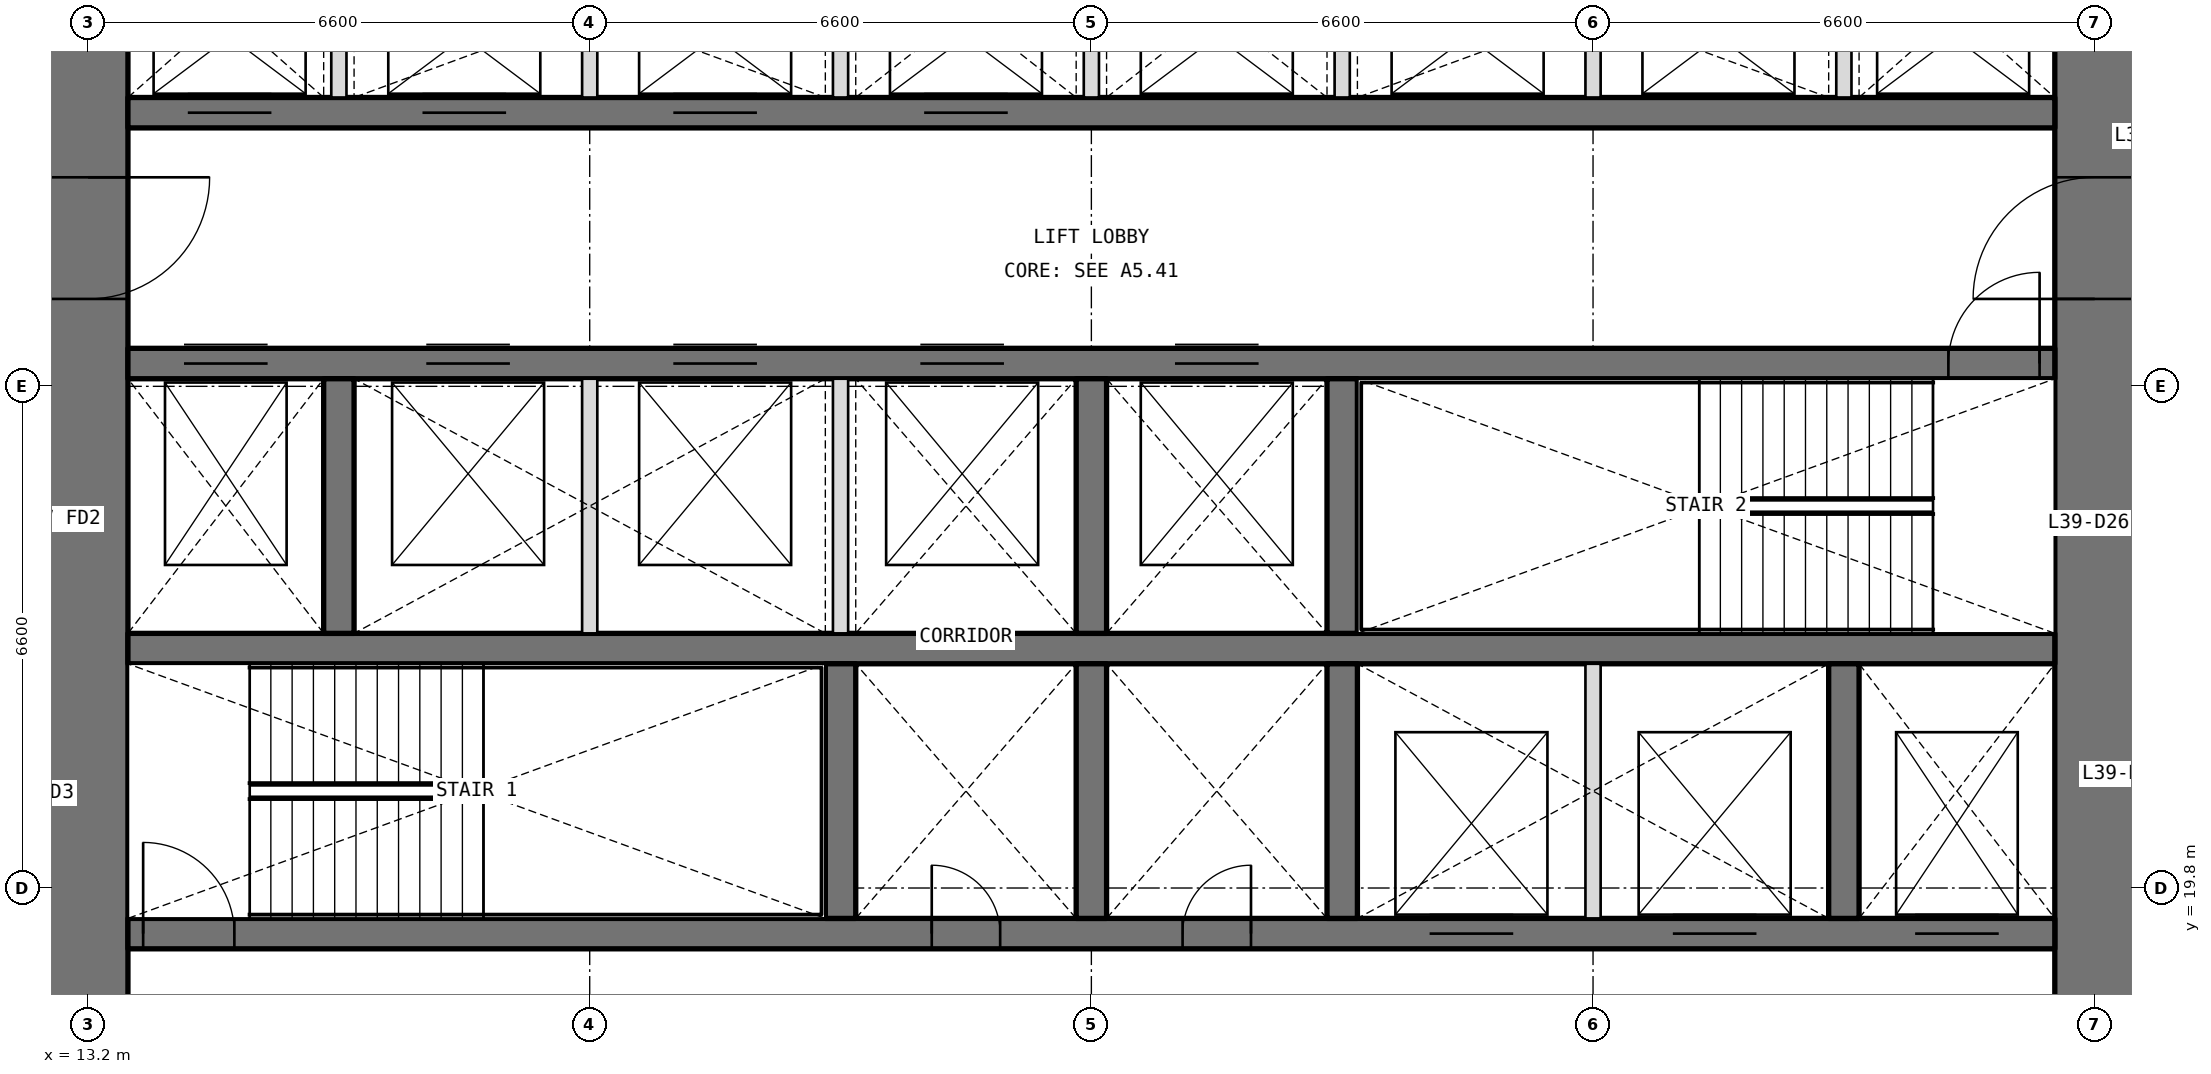
"""IFC4 building model, lengths in metres.
Left out: names, types, materials, properties, quantities, classifications, styles, units other than length and angle.
Written with IfcOpenShell. Run it as: python <this file> out.ifc"""

import sys

from ifc_helpers import new_model, si_unit, direction, frame, frame_2d, origin, place, context, subcontext, project, spatial, rectangle, extrude, element, fill, save


model = new_model("IFC4")
c1 = context("Model", 3, precision=1e-05, world=origin(), true_north=direction((0.0, 1.0)))
c2 = subcontext(c1, "Body", "Model", "MODEL_VIEW")
j1 = project(units=[si_unit("LENGTHUNIT", "METRE"), si_unit("PLANEANGLEUNIT", "RADIAN")], contexts=[c1])
p1 = place(None, origin())
s1 = spatial("IfcSite", under=j1, at=p1, CompositionType="ELEMENT")
p2 = place(p1, origin())
s2 = spatial("IfcBuilding", under=s1, at=p2, CompositionType="ELEMENT")
p3 = place(p2, frame((0.0, 0.0, 172.5)))
s3 = spatial("IfcBuildingStorey", under=s2, at=p3, CompositionType="ELEMENT", Elevation=172.5)
p4 = place(p3, frame((39.6, 13.725, 0.0), z_axis=(0.0, 0.0, 1.0), x_axis=(0.0, 1.0, 0.0)))
e1 = element("IfcWall", 1, at=p4, inside=s3, PredefinedType="SHEAR", context=c2, shape_type="SweptSolid", body=[
    extrude(rectangle(XDim=18.75, YDim=1.05, at=frame_2d((9.375, 0.0))), origin(), (0.0, 0.0, 1.0), 4.2),
])
p5 = place(p4, frame((3.025, 0.0, 0.0)))
e2 = element("IfcOpeningElement", 2, at=p5, cuts=e1, PredefinedType="OPENING", context=c2, shape_type="SweptSolid", body=[
    extrude(rectangle(XDim=1.6, YDim=2.1, at=frame_2d((0.8, 1.05))), frame((0.0, 0.535, 0.0), z_axis=(0.0, -1.0, 0.0), x_axis=(1.0, 0.0, 0.0)), (0.0, 0.0, 1.0), 1.07),
])
p6 = place(p4, frame((13.825, 0.0, 0.0)))
e3 = element("IfcOpeningElement", 3, at=p6, cuts=e1, PredefinedType="OPENING", context=c2, shape_type="SweptSolid", body=[
    extrude(rectangle(XDim=1.6, YDim=2.1, at=frame_2d((0.8, 1.05))), frame((0.0, 0.535, 0.0), z_axis=(0.0, -1.0, 0.0), x_axis=(1.0, 0.0, 0.0)), (0.0, 0.0, 1.0), 1.07),
])
p7 = place(p3, frame((13.2, 32.475, 0.0), z_axis=(0.0, 0.0, 1.0), x_axis=(0.0, -1.0, 0.0)))
e4 = element("IfcWall", 4, at=p7, inside=s3, PredefinedType="SHEAR", context=c2, shape_type="SweptSolid", body=[
    extrude(rectangle(XDim=18.75, YDim=1.05, at=frame_2d((9.375, 0.0))), origin(), (0.0, 0.0, 1.0), 4.2),
])
p8 = place(p7, frame((14.125, 0.0, 0.0)))
e5 = element("IfcOpeningElement", 5, at=p8, cuts=e4, PredefinedType="OPENING", context=c2, shape_type="SweptSolid", body=[
    extrude(rectangle(XDim=1.6, YDim=2.1, at=frame_2d((0.8, 1.05))), frame((0.0, 0.535, 0.0), z_axis=(0.0, -1.0, 0.0), x_axis=(1.0, 0.0, 0.0)), (0.0, 0.0, 1.0), 1.07),
])
p9 = place(p7, frame((3.325, 0.0, 0.0)))
e6 = element("IfcOpeningElement", 6, at=p9, cuts=e4, PredefinedType="OPENING", context=c2, shape_type="SweptSolid", body=[
    extrude(rectangle(XDim=1.6, YDim=2.1, at=frame_2d((0.8, 1.05))), frame((0.0, 0.535, 0.0), z_axis=(0.0, -1.0, 0.0), x_axis=(1.0, 0.0, 0.0)), (0.0, 0.0, 1.0), 1.07),
])
p10 = place(p3, frame((13.725, 19.2, 0.0), z_axis=(0.0, 0.0, 1.0), x_axis=(1.0, 0.0, 0.0)))
e7 = element("IfcWall", 7, at=p10, inside=s3, PredefinedType="SHEAR", context=c2, shape_type="SweptSolid", body=[
    extrude(rectangle(XDim=25.35, YDim=0.4, at=frame_2d((12.675, 0.0))), origin(), (0.0, 0.0, 1.0), 4.2),
])
p11 = place(p10, frame((10.575, 0.0, 0.0)))
e8 = element("IfcOpeningElement", 8, at=p11, cuts=e7, PredefinedType="OPENING", context=c2, shape_type="SweptSolid", body=[
    extrude(rectangle(XDim=0.9, YDim=2.1, at=frame_2d((0.45, 1.05))), frame((0.0, 0.21, 0.0), z_axis=(0.0, -1.0, 0.0), x_axis=(1.0, 0.0, 0.0)), (0.0, 0.0, 1.0), 0.42),
])
p12 = place(p10, frame((13.875, 0.0, 0.0)))
e9 = element("IfcOpeningElement", 9, at=p12, cuts=e7, PredefinedType="OPENING", context=c2, shape_type="SweptSolid", body=[
    extrude(rectangle(XDim=0.9, YDim=2.1, at=frame_2d((0.45, 1.05))), frame((0.0, 0.21, 0.0), z_axis=(0.0, -1.0, 0.0), x_axis=(1.0, 0.0, 0.0)), (0.0, 0.0, 1.0), 0.42),
])
p13 = place(p10, frame((0.2, 0.0, 0.0)))
e10 = element("IfcOpeningElement", 10, at=p13, cuts=e7, PredefinedType="OPENING", context=c2, shape_type="SweptSolid", body=[
    extrude(rectangle(XDim=1.2, YDim=2.1, at=frame_2d((0.6, 1.05))), frame((0.0, 0.21, 0.0), z_axis=(0.0, -1.0, 0.0), x_axis=(1.0, 0.0, 0.0)), (0.0, 0.0, 1.0), 0.42),
])
p14 = place(p10, frame((23.512, 0.0, 0.0)))
e11 = element("IfcOpeningElement", 11, at=p14, cuts=e7, PredefinedType="OPENING", context=c2, shape_type="SweptSolid", body=[
    extrude(rectangle(XDim=1.1, YDim=2.1, at=frame_2d((0.55, 1.05))), frame((0.0, 0.21, 0.0), z_axis=(0.0, -1.0, 0.0), x_axis=(1.0, 0.0, 0.0)), (0.0, 0.0, 1.0), 0.42),
])
p15 = place(p10, frame((17.125, 0.0, 0.0)))
e12 = element("IfcOpeningElement", 12, at=p15, cuts=e7, PredefinedType="OPENING", context=c2, shape_type="SweptSolid", body=[
    extrude(rectangle(XDim=1.1, YDim=2.1, at=frame_2d((0.55, 1.05))), frame((0.0, 0.21, 0.0), z_axis=(0.0, -1.0, 0.0), x_axis=(1.0, 0.0, 0.0)), (0.0, 0.0, 1.0), 0.42),
])
p16 = place(p10, frame((20.325, 0.0, 0.0)))
e13 = element("IfcOpeningElement", 13, at=p16, cuts=e7, PredefinedType="OPENING", context=c2, shape_type="SweptSolid", body=[
    extrude(rectangle(XDim=1.1, YDim=2.1, at=frame_2d((0.55, 1.05))), frame((0.0, 0.21, 0.0), z_axis=(0.0, -1.0, 0.0), x_axis=(1.0, 0.0, 0.0)), (0.0, 0.0, 1.0), 0.42),
])
p17 = place(p3, frame((13.725, 22.95, 0.0), z_axis=(0.0, 0.0, 1.0), x_axis=(1.0, 0.0, 0.0)))
e14 = element("IfcWall", 14, at=p17, inside=s3, PredefinedType="SHEAR", context=c2, shape_type="SweptSolid", body=[
    extrude(rectangle(XDim=25.35, YDim=0.4, at=frame_2d((12.675, 0.0))), origin(), (0.0, 0.0, 1.0), 4.2),
])
p18 = place(p3, frame((13.725, 26.7, 0.0), z_axis=(0.0, 0.0, 1.0), x_axis=(1.0, 0.0, 0.0)))
e15 = element("IfcWall", 15, at=p18, inside=s3, PredefinedType="SHEAR", context=c2, shape_type="SweptSolid", body=[
    extrude(rectangle(XDim=25.35, YDim=0.4, at=frame_2d((12.675, 0.0))), origin(), (0.0, 0.0, 1.0), 4.2),
])
p19 = place(p18, frame((23.95, 0.0, 0.0)))
e16 = element("IfcOpeningElement", 16, at=p19, cuts=e15, PredefinedType="OPENING", context=c2, shape_type="SweptSolid", body=[
    extrude(rectangle(XDim=1.2, YDim=2.1, at=frame_2d((0.6, 1.05))), frame((0.0, 0.21, 0.0), z_axis=(0.0, -1.0, 0.0), x_axis=(1.0, 0.0, 0.0)), (0.0, 0.0, 1.0), 0.42),
])
p20 = place(p18, frame((0.738, 0.0, 0.0)))
e17 = element("IfcOpeningElement", 17, at=p20, cuts=e15, PredefinedType="OPENING", context=c2, shape_type="SweptSolid", body=[
    extrude(rectangle(XDim=1.1, YDim=2.1, at=frame_2d((0.55, 1.05))), frame((0.0, 0.21, 0.0), z_axis=(0.0, -1.0, 0.0), x_axis=(1.0, 0.0, 0.0)), (0.0, 0.0, 1.0), 0.42),
])
p21 = place(p18, frame((3.925, 0.0, 0.0)))
e18 = element("IfcOpeningElement", 18, at=p21, cuts=e15, PredefinedType="OPENING", context=c2, shape_type="SweptSolid", body=[
    extrude(rectangle(XDim=1.1, YDim=2.1, at=frame_2d((0.55, 1.05))), frame((0.0, 0.21, 0.0), z_axis=(0.0, -1.0, 0.0), x_axis=(1.0, 0.0, 0.0)), (0.0, 0.0, 1.0), 0.42),
])
p22 = place(p18, frame((7.175, 0.0, 0.0)))
e19 = element("IfcOpeningElement", 19, at=p22, cuts=e15, PredefinedType="OPENING", context=c2, shape_type="SweptSolid", body=[
    extrude(rectangle(XDim=1.1, YDim=2.1, at=frame_2d((0.55, 1.05))), frame((0.0, 0.21, 0.0), z_axis=(0.0, -1.0, 0.0), x_axis=(1.0, 0.0, 0.0)), (0.0, 0.0, 1.0), 0.42),
])
p23 = place(p18, frame((10.425, 0.0, 0.0)))
e20 = element("IfcOpeningElement", 20, at=p23, cuts=e15, PredefinedType="OPENING", context=c2, shape_type="SweptSolid", body=[
    extrude(rectangle(XDim=1.1, YDim=2.1, at=frame_2d((0.55, 1.05))), frame((0.0, 0.21, 0.0), z_axis=(0.0, -1.0, 0.0), x_axis=(1.0, 0.0, 0.0)), (0.0, 0.0, 1.0), 0.42),
])
p24 = place(p18, frame((13.775, 0.0, 0.0)))
e21 = element("IfcOpeningElement", 21, at=p24, cuts=e15, PredefinedType="OPENING", context=c2, shape_type="SweptSolid", body=[
    extrude(rectangle(XDim=1.1, YDim=2.1, at=frame_2d((0.55, 1.05))), frame((0.0, 0.21, 0.0), z_axis=(0.0, -1.0, 0.0), x_axis=(1.0, 0.0, 0.0)), (0.0, 0.0, 1.0), 0.42),
])
p25 = place(p3, frame((13.725, 30.0, 0.0), z_axis=(0.0, 0.0, 1.0), x_axis=(1.0, 0.0, 0.0)))
e22 = element("IfcWall", 22, at=p25, inside=s3, PredefinedType="SHEAR", context=c2, shape_type="SweptSolid", body=[
    extrude(rectangle(XDim=25.35, YDim=0.4, at=frame_2d((12.675, 0.0))), origin(), (0.0, 0.0, 1.0), 4.2),
])
p26 = place(p25, frame((0.788, 0.0, 0.0)))
e23 = element("IfcOpeningElement", 23, at=p26, cuts=e22, PredefinedType="OPENING", context=c2, shape_type="SweptSolid", body=[
    extrude(rectangle(XDim=1.1, YDim=2.1, at=frame_2d((0.55, 1.05))), frame((0.0, 0.21, 0.0), z_axis=(0.0, -1.0, 0.0), x_axis=(1.0, 0.0, 0.0)), (0.0, 0.0, 1.0), 0.42),
])
p27 = place(p25, frame((3.875, 0.0, 0.0)))
e24 = element("IfcOpeningElement", 24, at=p27, cuts=e22, PredefinedType="OPENING", context=c2, shape_type="SweptSolid", body=[
    extrude(rectangle(XDim=1.1, YDim=2.1, at=frame_2d((0.55, 1.05))), frame((0.0, 0.21, 0.0), z_axis=(0.0, -1.0, 0.0), x_axis=(1.0, 0.0, 0.0)), (0.0, 0.0, 1.0), 0.42),
])
p28 = place(p25, frame((7.175, 0.0, 0.0)))
e25 = element("IfcOpeningElement", 25, at=p28, cuts=e22, PredefinedType="OPENING", context=c2, shape_type="SweptSolid", body=[
    extrude(rectangle(XDim=1.1, YDim=2.1, at=frame_2d((0.55, 1.05))), frame((0.0, 0.21, 0.0), z_axis=(0.0, -1.0, 0.0), x_axis=(1.0, 0.0, 0.0)), (0.0, 0.0, 1.0), 0.42),
])
p29 = place(p25, frame((10.475, 0.0, 0.0)))
e26 = element("IfcOpeningElement", 26, at=p29, cuts=e22, PredefinedType="OPENING", context=c2, shape_type="SweptSolid", body=[
    extrude(rectangle(XDim=1.1, YDim=2.1, at=frame_2d((0.55, 1.05))), frame((0.0, 0.21, 0.0), z_axis=(0.0, -1.0, 0.0), x_axis=(1.0, 0.0, 0.0)), (0.0, 0.0, 1.0), 0.42),
])
for number, where, z_axis, x_axis in (
    (27, (23.1, 19.4, 0.0), (0.0, 0.0, 1.0), (0.0, 1.0, 0.0)),
    (28, (26.4, 19.4, 0.0), (0.0, 0.0, 1.0), (0.0, 1.0, 0.0)),
    (29, (29.7, 19.4, 0.0), (0.0, 0.0, 1.0), (0.0, 1.0, 0.0)),
    (30, (36.3, 19.4, 0.0), (0.0, 0.0, 1.0), (0.0, 1.0, 0.0)),
    (31, (16.5, 23.15, 0.0), (0.0, 0.0, 1.0), (0.0, 1.0, 0.0)),
    (32, (26.4, 23.15, 0.0), (0.0, 0.0, 1.0), (0.0, 1.0, 0.0)),
    (33, (29.7, 23.15, 0.0), (0.0, 0.0, 1.0), (0.0, 1.0, 0.0)),
):
    element("IfcWall", number, at=place(p3, frame(where, z_axis=z_axis, x_axis=x_axis)), inside=s3, PredefinedType="SHEAR", context=c2, shape_type="SweptSolid", body=[
        extrude(rectangle(XDim=3.35, YDim=0.4, at=frame_2d((1.675, 0.0))), origin(), (0.0, 0.0, 1.0), 4.2),
    ])
for number, where, z_axis, x_axis in (
    (34, (16.5, 30.2, 0.0), (0.0, 0.0, 1.0), (0.0, 1.0, 0.0)),
    (35, (19.8, 30.2, 0.0), (0.0, 0.0, 1.0), (0.0, 1.0, 0.0)),
    (36, (23.1, 30.2, 0.0), (0.0, 0.0, 1.0), (0.0, 1.0, 0.0)),
    (37, (26.4, 30.2, 0.0), (0.0, 0.0, 1.0), (0.0, 1.0, 0.0)),
    (38, (29.7, 30.2, 0.0), (0.0, 0.0, 1.0), (0.0, 1.0, 0.0)),
    (39, (33.0, 30.2, 0.0), (0.0, 0.0, 1.0), (0.0, 1.0, 0.0)),
    (40, (36.3, 30.2, 0.0), (0.0, 0.0, 1.0), (0.0, 1.0, 0.0)),
):
    element("IfcWall", number, at=place(p3, frame(where, z_axis=z_axis, x_axis=x_axis)), inside=s3, PredefinedType="PARTITIONING", context=c2, shape_type="SweptSolid", body=[
        extrude(rectangle(XDim=2.275, YDim=0.2, at=frame_2d((1.138, 0.0))), origin(), (0.0, 0.0, 1.0), 4.2),
    ])
for number, where, z_axis, x_axis in (
    (41, (33.0, 19.4, 0.0), (0.0, 0.0, 1.0), (0.0, 1.0, 0.0)),
    (42, (19.8, 23.15, 0.0), (0.0, 0.0, 1.0), (0.0, 1.0, 0.0)),
    (43, (23.1, 23.15, 0.0), (0.0, 0.0, 1.0), (0.0, 1.0, 0.0)),
):
    element("IfcWall", number, at=place(p3, frame(where, z_axis=z_axis, x_axis=x_axis)), inside=s3, PredefinedType="PARTITIONING", context=c2, shape_type="SweptSolid", body=[
        extrude(rectangle(XDim=3.35, YDim=0.2, at=frame_2d((1.675, 0.0))), origin(), (0.0, 0.0, 1.0), 4.2),
    ])
p30 = place(p11, origin())
e44 = element("IfcDoor", 44, at=p30, inside=s3, OperationType="SINGLE_SWING_LEFT", PredefinedType="DOOR", context=c2, shape_type="SweptSolid", body=[
    extrude(rectangle(XDim=0.9, YDim=2.1, at=frame_2d((0.45, 1.05))), frame((0.0, 0.025, 0.0), z_axis=(0.0, -1.0, 0.0), x_axis=(1.0, 0.0, 0.0)), (0.0, 0.0, 1.0), 0.05),
])
fill(e8, e44)
p31 = place(p12, origin())
e45 = element("IfcDoor", 45, at=p31, inside=s3, OperationType="SINGLE_SWING_RIGHT", PredefinedType="DOOR", context=c2, shape_type="SweptSolid", body=[
    extrude(rectangle(XDim=0.9, YDim=2.1, at=frame_2d((0.45, 1.05))), frame((0.0, 0.025, 0.0), z_axis=(0.0, -1.0, 0.0), x_axis=(1.0, 0.0, 0.0)), (0.0, 0.0, 1.0), 0.05),
])
fill(e9, e45)
p32 = place(p13, origin())
e46 = element("IfcDoor", 46, at=p32, inside=s3, OperationType="SINGLE_SWING_LEFT", PredefinedType="DOOR", context=c2, shape_type="SweptSolid", body=[
    extrude(rectangle(XDim=1.2, YDim=2.1, at=frame_2d((0.6, 1.05))), frame((0.0, 0.025, 0.0), z_axis=(0.0, -1.0, 0.0), x_axis=(1.0, 0.0, 0.0)), (0.0, 0.0, 1.0), 0.05),
])
fill(e10, e46)
p33 = place(p19, origin())
e47 = element("IfcDoor", 47, at=p33, inside=s3, OperationType="SINGLE_SWING_RIGHT", PredefinedType="DOOR", context=c2, shape_type="SweptSolid", body=[
    extrude(rectangle(XDim=1.2, YDim=2.1, at=frame_2d((0.6, 1.05))), frame((0.0, 0.025, 0.0), z_axis=(0.0, -1.0, 0.0), x_axis=(1.0, 0.0, 0.0)), (0.0, 0.0, 1.0), 0.05),
])
fill(e16, e47)
p34 = place(p9, origin())
e48 = element("IfcDoor", 48, at=p34, inside=s3, OperationType="DOUBLE_DOOR_DOUBLE_SWING", PredefinedType="DOOR", context=c2, shape_type="SweptSolid", body=[
    extrude(rectangle(XDim=1.6, YDim=2.1, at=frame_2d((0.8, 1.05))), frame((0.0, 0.025, 0.0), z_axis=(0.0, -1.0, 0.0), x_axis=(1.0, 0.0, 0.0)), (0.0, 0.0, 1.0), 0.05),
])
fill(e6, e48)
p35 = place(p6, origin())
e49 = element("IfcDoor", 49, at=p35, inside=s3, OperationType="DOUBLE_DOOR_DOUBLE_SWING", PredefinedType="DOOR", context=c2, shape_type="SweptSolid", body=[
    extrude(rectangle(XDim=1.6, YDim=2.1, at=frame_2d((0.8, 1.05))), frame((0.0, 0.025, 0.0), z_axis=(0.0, -1.0, 0.0), x_axis=(1.0, 0.0, 0.0)), (0.0, 0.0, 1.0), 0.05),
])
fill(e3, e49)
p36 = place(p26, origin())
e50 = element("IfcDoor", 50, at=p36, inside=s3, OperationType="DOUBLE_DOOR_SLIDING", PredefinedType="DOOR", context=c2, shape_type="SweptSolid", body=[
    extrude(rectangle(XDim=1.1, YDim=2.1, at=frame_2d((0.55, 1.05))), frame((0.0, 0.025, 0.0), z_axis=(0.0, -1.0, 0.0), x_axis=(1.0, 0.0, 0.0)), (0.0, 0.0, 1.0), 0.05),
])
fill(e23, e50)
p37 = place(p27, origin())
e51 = element("IfcDoor", 51, at=p37, inside=s3, OperationType="DOUBLE_DOOR_SLIDING", PredefinedType="DOOR", context=c2, shape_type="SweptSolid", body=[
    extrude(rectangle(XDim=1.1, YDim=2.1, at=frame_2d((0.55, 1.05))), frame((0.0, 0.025, 0.0), z_axis=(0.0, -1.0, 0.0), x_axis=(1.0, 0.0, 0.0)), (0.0, 0.0, 1.0), 0.05),
])
fill(e24, e51)
p38 = place(p28, origin())
e52 = element("IfcDoor", 52, at=p38, inside=s3, OperationType="DOUBLE_DOOR_SLIDING", PredefinedType="DOOR", context=c2, shape_type="SweptSolid", body=[
    extrude(rectangle(XDim=1.1, YDim=2.1, at=frame_2d((0.55, 1.05))), frame((0.0, 0.025, 0.0), z_axis=(0.0, -1.0, 0.0), x_axis=(1.0, 0.0, 0.0)), (0.0, 0.0, 1.0), 0.05),
])
fill(e25, e52)
p39 = place(p29, origin())
e53 = element("IfcDoor", 53, at=p39, inside=s3, OperationType="DOUBLE_DOOR_SLIDING", PredefinedType="DOOR", context=c2, shape_type="SweptSolid", body=[
    extrude(rectangle(XDim=1.1, YDim=2.1, at=frame_2d((0.55, 1.05))), frame((0.0, 0.025, 0.0), z_axis=(0.0, -1.0, 0.0), x_axis=(1.0, 0.0, 0.0)), (0.0, 0.0, 1.0), 0.05),
])
fill(e26, e53)
p40 = place(p20, origin())
e54 = element("IfcDoor", 54, at=p40, inside=s3, OperationType="DOUBLE_DOOR_SLIDING", PredefinedType="DOOR", context=c2, shape_type="SweptSolid", body=[
    extrude(rectangle(XDim=1.1, YDim=2.1, at=frame_2d((0.55, 1.05))), frame((0.0, 0.025, 0.0), z_axis=(0.0, -1.0, 0.0), x_axis=(1.0, 0.0, 0.0)), (0.0, 0.0, 1.0), 0.05),
])
fill(e17, e54)
p41 = place(p14, origin())
e55 = element("IfcDoor", 55, at=p41, inside=s3, OperationType="DOUBLE_DOOR_SLIDING", PredefinedType="DOOR", context=c2, shape_type="SweptSolid", body=[
    extrude(rectangle(XDim=1.1, YDim=2.1, at=frame_2d((0.55, 1.05))), frame((0.0, 0.025, 0.0), z_axis=(0.0, -1.0, 0.0), x_axis=(1.0, 0.0, 0.0)), (0.0, 0.0, 1.0), 0.05),
])
fill(e11, e55)
p42 = place(p15, origin())
e56 = element("IfcDoor", 56, at=p42, inside=s3, OperationType="DOUBLE_DOOR_SLIDING", PredefinedType="DOOR", context=c2, shape_type="SweptSolid", body=[
    extrude(rectangle(XDim=1.1, YDim=2.1, at=frame_2d((0.55, 1.05))), frame((0.0, 0.025, 0.0), z_axis=(0.0, -1.0, 0.0), x_axis=(1.0, 0.0, 0.0)), (0.0, 0.0, 1.0), 0.05),
])
fill(e12, e56)
p43 = place(p16, origin())
e57 = element("IfcDoor", 57, at=p43, inside=s3, OperationType="DOUBLE_DOOR_SLIDING", PredefinedType="DOOR", context=c2, shape_type="SweptSolid", body=[
    extrude(rectangle(XDim=1.1, YDim=2.1, at=frame_2d((0.55, 1.05))), frame((0.0, 0.025, 0.0), z_axis=(0.0, -1.0, 0.0), x_axis=(1.0, 0.0, 0.0)), (0.0, 0.0, 1.0), 0.05),
])
fill(e13, e57)
p44 = place(p21, origin())
e58 = element("IfcDoor", 58, at=p44, inside=s3, OperationType="DOUBLE_DOOR_SLIDING", PredefinedType="DOOR", context=c2, shape_type="SweptSolid", body=[
    extrude(rectangle(XDim=1.1, YDim=2.1, at=frame_2d((0.55, 1.05))), frame((0.0, 0.025, 0.0), z_axis=(0.0, -1.0, 0.0), x_axis=(1.0, 0.0, 0.0)), (0.0, 0.0, 1.0), 0.05),
])
fill(e18, e58)
p45 = place(p22, origin())
e59 = element("IfcDoor", 59, at=p45, inside=s3, OperationType="DOUBLE_DOOR_SLIDING", PredefinedType="DOOR", context=c2, shape_type="SweptSolid", body=[
    extrude(rectangle(XDim=1.1, YDim=2.1, at=frame_2d((0.55, 1.05))), frame((0.0, 0.025, 0.0), z_axis=(0.0, -1.0, 0.0), x_axis=(1.0, 0.0, 0.0)), (0.0, 0.0, 1.0), 0.05),
])
fill(e19, e59)
p46 = place(p23, origin())
e60 = element("IfcDoor", 60, at=p46, inside=s3, OperationType="DOUBLE_DOOR_SLIDING", PredefinedType="DOOR", context=c2, shape_type="SweptSolid", body=[
    extrude(rectangle(XDim=1.1, YDim=2.1, at=frame_2d((0.55, 1.05))), frame((0.0, 0.025, 0.0), z_axis=(0.0, -1.0, 0.0), x_axis=(1.0, 0.0, 0.0)), (0.0, 0.0, 1.0), 0.05),
])
fill(e20, e60)
p47 = place(p24, origin())
e61 = element("IfcDoor", 61, at=p47, inside=s3, OperationType="DOUBLE_DOOR_SLIDING", PredefinedType="DOOR", context=c2, shape_type="SweptSolid", body=[
    extrude(rectangle(XDim=1.1, YDim=2.1, at=frame_2d((0.55, 1.05))), frame((0.0, 0.025, 0.0), z_axis=(0.0, -1.0, 0.0), x_axis=(1.0, 0.0, 0.0)), (0.0, 0.0, 1.0), 0.05),
])
fill(e21, e61)
save(model, sys.argv[1])
